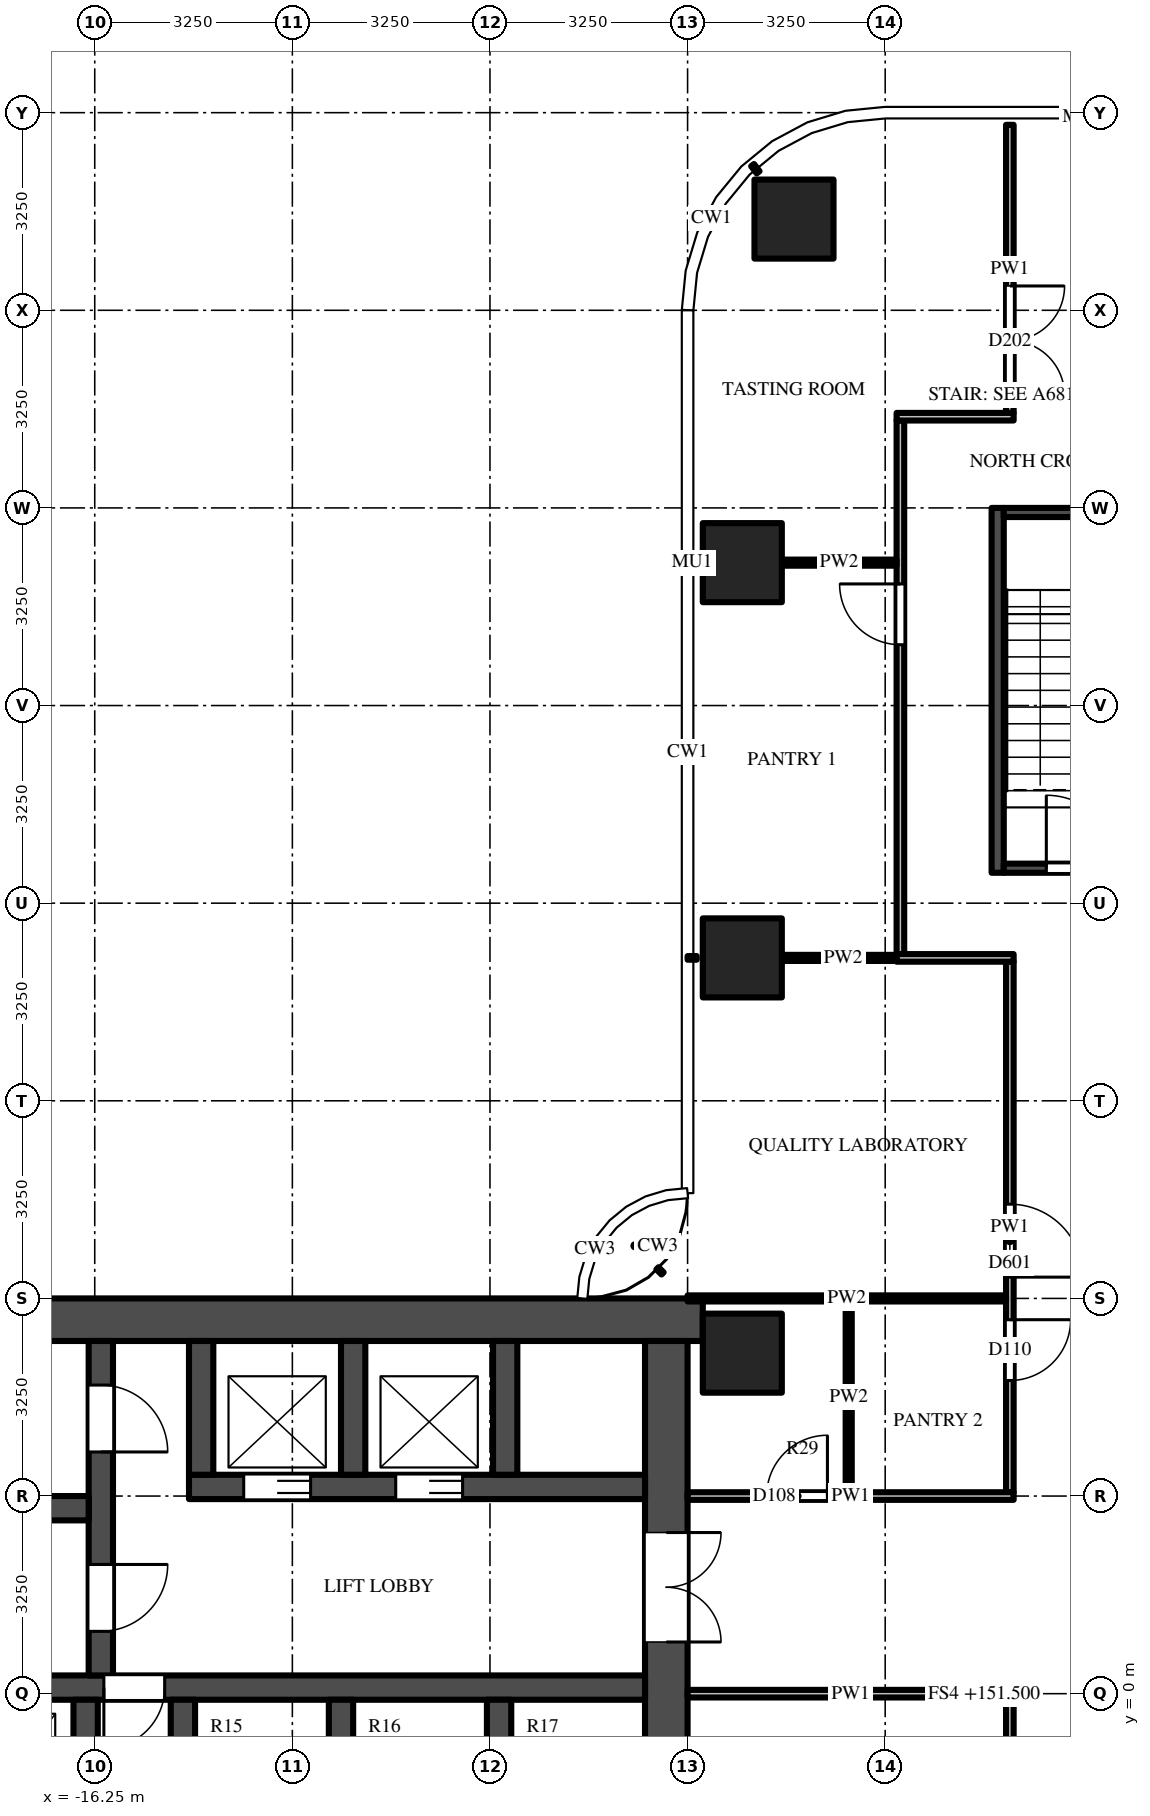
"""IFC4 building model, lengths in metres.
Left out: names, types, materials, properties, quantities, classifications, styles, units other than length and angle.
Written with IfcOpenShell. Run it as: python <this file> out.ifc"""

import sys

from ifc_helpers import new_model, si_unit, direction, frame, frame_2d, origin, origin_2d, place, context, subcontext, project, spatial, rectangle, extrude, source, transform, mapped, element, fill, save


model = new_model("IFC4")
c1 = context("Model", 3, precision=1e-05, world=origin(), true_north=direction((0.0, 1.0)))
c2 = subcontext(c1, "Body", "Model", "MODEL_VIEW")
j1 = project(units=[si_unit("LENGTHUNIT", "METRE"), si_unit("PLANEANGLEUNIT", "RADIAN")], contexts=[c1])
p1 = place(None, origin())
s1 = spatial("IfcSite", under=j1, at=p1, CompositionType="ELEMENT")
p2 = place(p1, origin())
s2 = spatial("IfcBuilding", under=s1, at=p2, CompositionType="ELEMENT")
p3 = place(p2, frame((0.0, 0.0, 151.5)))
s3 = spatial("IfcBuildingStorey", under=s2, at=p3, CompositionType="ELEMENT", Elevation=151.5)
m1 = source(origin(), c2, "Body", "SweptSolid", [
    extrude(rectangle(XDim=1.3, YDim=1.3, at=origin_2d()), origin(), (0.0, 0.0, 1.0), 4.5),
])
for number, where, z_axis, x_axis in (
    (1, (-5.6, 12.1, 0.0), (0.0, 0.0, 1.0), (1.0, 0.0, 0.0)),
    (2, (-5.6, 18.6, 0.0), (0.0, 0.0, 1.0), (1.0, 0.0, 0.0)),
    (3, (-4.75, 24.25, 0.0), (0.0, 0.0, 1.0), (1.0, 0.0, 0.0)),
    (4, (-5.6, 5.6, 0.0), (0.0, 0.0, 1.0), (1.0, 0.0, 0.0)),
):
    element("IfcColumn", number, at=place(p3, frame(where, z_axis=z_axis, x_axis=x_axis)), inside=s3, PredefinedType="COLUMN", context=c2, shape_type="MappedRepresentation", body=[
        mapped(m1, transform((0.0, 0.0, 0.0))),
    ])
m2 = source(origin(), c2, "Body", "SweptSolid", [
    extrude(rectangle(XDim=16.5, YDim=0.7, at=frame_2d((8.25, 0.0))), origin(), (0.0, 0.0, 1.0), 4.15),
])
p4 = place(p3, frame((-6.25, 6.15, 0.0), z_axis=(0.0, 0.0, 1.0), x_axis=(-1.0, 0.0, 0.0)))
e5 = element("IfcWall", 5, at=p4, inside=s3, PredefinedType="SHEAR", context=c2, shape_type="MappedRepresentation", body=[
    mapped(m2, transform((0.0, 0.0, 0.0))),
])
m3 = source(origin(), c2, "Body", "SweptSolid", [
    extrude(rectangle(XDim=9.05, YDim=0.7, at=frame_2d((4.525, 0.0))), origin(), (0.0, 0.0, 1.0), 4.15),
])
p5 = place(p3, frame((-6.85, 5.8, 0.0), z_axis=(0.0, 0.0, 1.0), x_axis=(0.0, -1.0, 0.0)))
e6 = element("IfcWall", 6, at=p5, inside=s3, PredefinedType="SHEAR", context=c2, shape_type="MappedRepresentation", body=[
    mapped(m3, transform((0.0, 0.0, 0.0))),
])
m4 = source(origin(), c2, "Body", "SweptSolid", [
    extrude(rectangle(XDim=1.8, YDim=2.1, at=frame_2d((0.9, 1.05))), frame((0.0, 0.36, 0.0), z_axis=(0.0, -1.0, 0.0), x_axis=(1.0, 0.0, 0.0)), (0.0, 0.0, 1.0), 0.72),
])
p6 = place(p5, frame((3.15, 0.0, 0.0)))
e7 = element("IfcOpeningElement", 7, at=p6, cuts=e6, PredefinedType="OPENING", context=c2, shape_type="MappedRepresentation", body=[
    mapped(m4, transform((0.0, 0.0, 0.0))),
])
m5 = source(origin(), c2, "Body", "SweptSolid", [
    extrude(rectangle(XDim=7.5, YDim=0.4, at=frame_2d((3.75, 0.0))), origin(), (0.0, 0.0, 1.0), 4.15),
])
p7 = place(p3, frame((-7.2, 3.4, 0.0), z_axis=(0.0, 0.0, 1.0), x_axis=(-1.0, 0.0, 0.0)))
e8 = element("IfcWall", 8, at=p7, inside=s3, PredefinedType="SHEAR", context=c2, shape_type="MappedRepresentation", body=[
    mapped(m5, transform((0.0, 0.0, 0.0))),
])
m6 = source(origin(), c2, "Body", "SweptSolid", [
    extrude(rectangle(XDim=1.1, YDim=2.1, at=frame_2d((0.55, 1.05))), frame((0.0, 0.21, 0.0), z_axis=(0.0, -1.0, 0.0), x_axis=(1.0, 0.0, 0.0)), (0.0, 0.0, 1.0), 0.42),
])
p8 = place(p7, frame((3.0, 0.0, 0.0)))
e9 = element("IfcOpeningElement", 9, at=p8, cuts=e8, PredefinedType="OPENING", context=c2, shape_type="MappedRepresentation", body=[
    mapped(m6, transform((0.0, 0.0, 0.0))),
])
p9 = place(p7, frame((5.5, 0.0, 0.0)))
e10 = element("IfcOpeningElement", 10, at=p9, cuts=e8, PredefinedType="OPENING", context=c2, shape_type="MappedRepresentation", body=[
    mapped(m6, transform((0.0, 0.0, 0.0))),
])
m7 = source(origin(), c2, "Body", "SweptSolid", [
    extrude(rectangle(XDim=14.85, YDim=0.4, at=frame_2d((7.425, 0.0))), origin(), (0.0, 0.0, 1.0), 4.15),
])
p10 = place(p3, frame((-7.2, 0.1, 0.0), z_axis=(0.0, 0.0, 1.0), x_axis=(-1.0, 0.0, 0.0)))
e11 = element("IfcWall", 11, at=p10, inside=s3, PredefinedType="SHEAR", context=c2, shape_type="MappedRepresentation", body=[
    mapped(m7, transform((0.0, 0.0, 0.0))),
])
m8 = source(origin(), c2, "Body", "SweptSolid", [
    extrude(rectangle(XDim=1.0, YDim=2.1, at=frame_2d((0.5, 1.05))), frame((0.0, 0.21, 0.0), z_axis=(0.0, -1.0, 0.0), x_axis=(1.0, 0.0, 0.0)), (0.0, 0.0, 1.0), 0.42),
])
p11 = place(p10, frame((7.9, 0.0, 0.0)))
e12 = element("IfcOpeningElement", 12, at=p11, cuts=e11, PredefinedType="OPENING", context=c2, shape_type="MappedRepresentation", body=[
    mapped(m8, transform((0.0, 0.0, 0.0))),
])
m9 = source(origin(), c2, "Body", "SweptSolid", [
    extrude(rectangle(XDim=5.5, YDim=0.4, at=frame_2d((2.75, 0.0))), origin(), (0.0, 0.0, 1.0), 4.15),
])
p12 = place(p3, frame((-16.15, 5.8, 0.0), z_axis=(0.0, 0.0, 1.0), x_axis=(0.0, -1.0, 0.0)))
e13 = element("IfcWall", 13, at=p12, inside=s3, PredefinedType="SHEAR", context=c2, shape_type="MappedRepresentation", body=[
    mapped(m9, transform((0.0, 0.0, 0.0))),
])
p13 = place(p12, frame((0.725, 0.0, 0.0)))
e14 = element("IfcOpeningElement", 14, at=p13, cuts=e13, PredefinedType="OPENING", context=c2, shape_type="MappedRepresentation", body=[
    mapped(m6, transform((0.0, 0.0, 0.0))),
])
p14 = place(p12, frame((3.675, 0.0, 0.0)))
e15 = element("IfcOpeningElement", 15, at=p14, cuts=e13, PredefinedType="OPENING", context=c2, shape_type="MappedRepresentation", body=[
    mapped(m6, transform((0.0, 0.0, 0.0))),
])
m10 = source(origin(), c2, "Body", "SweptSolid", [
    extrude(rectangle(XDim=5.7, YDim=0.4, at=frame_2d((2.85, 0.0))), origin(), (0.0, 0.0, 1.0), 4.15),
])
p15 = place(p3, frame((-16.35, 3.05, 0.0), z_axis=(0.0, 0.0, 1.0), x_axis=(-1.0, 0.0, 0.0)))
e16 = element("IfcWall", 16, at=p15, inside=s3, PredefinedType="SHEAR", context=c2, shape_type="MappedRepresentation", body=[
    mapped(m10, transform((0.0, 0.0, 0.0))),
])
m11 = source(origin(), c2, "Body", "SweptSolid", [
    extrude(rectangle(XDim=2.2, YDim=0.4, at=frame_2d((1.1, 0.0))), origin(), (0.0, 0.0, 1.0), 4.15),
])
for number, where, z_axis, x_axis in (
    (17, (-9.5, 5.8, 0.0), (0.0, 0.0, 1.0), (0.0, -1.0, 0.0)),
    (18, (-12.0, 5.8, 0.0), (0.0, 0.0, 1.0), (0.0, -1.0, 0.0)),
    (19, (-14.5, 5.8, 0.0), (0.0, 0.0, 1.0), (0.0, -1.0, 0.0)),
):
    element("IfcWall", number, at=place(p3, frame(where, z_axis=z_axis, x_axis=x_axis)), inside=s3, PredefinedType="SHEAR", context=c2, shape_type="MappedRepresentation", body=[
        mapped(m11, transform((0.0, 0.0, 0.0))),
    ])
m12 = source(origin(), c2, "Body", "SweptSolid", [
    extrude(rectangle(XDim=2.45, YDim=0.4, at=frame_2d((1.225, 0.0))), origin(), (0.0, 0.0, 1.0), 4.15),
])
for number, where, z_axis, x_axis in (
    (20, (-9.6, -0.1, 0.0), (0.0, 0.0, 1.0), (0.0, -1.0, 0.0)),
    (21, (-12.2, -0.1, 0.0), (0.0, 0.0, 1.0), (0.0, -1.0, 0.0)),
    (22, (-14.8, -0.1, 0.0), (0.0, 0.0, 1.0), (0.0, -1.0, 0.0)),
    (23, (-16.4, -0.1, 0.0), (0.0, 0.0, 1.0), (0.0, -1.0, 0.0)),
):
    element("IfcWall", number, at=place(p3, frame(where, z_axis=z_axis, x_axis=x_axis)), inside=s3, PredefinedType="SHEAR", context=c2, shape_type="MappedRepresentation", body=[
        mapped(m12, transform((0.0, 0.0, 0.0))),
    ])
m13 = source(origin(), c2, "Body", "SweptSolid", [
    extrude(rectangle(XDim=6.0, YDim=0.2, at=frame_2d((3.0, 0.0))), origin(), (0.0, 0.0, 1.0), 4.15),
])
p16 = place(p3, frame((-1.4, 13.5, 0.0), z_axis=(0.0, 0.0, 1.0), x_axis=(0.0, 1.0, 0.0)))
e24 = element("IfcWall", 24, at=p16, inside=s3, PredefinedType="SHEAR", context=c2, shape_type="MappedRepresentation", body=[
    mapped(m13, transform((0.0, 0.0, 0.0))),
])
m14 = source(origin(), c2, "Body", "SweptSolid", [
    extrude(rectangle(XDim=2.6, YDim=0.15, at=frame_2d((1.3, 0.0))), origin(), (0.0, 0.0, 1.0), 4.15),
])
p17 = place(p3, frame((-1.3, 13.575, 0.0), z_axis=(0.0, 0.0, 1.0), x_axis=(1.0, 0.0, 0.0)))
e25 = element("IfcWall", 25, at=p17, inside=s3, PredefinedType="SHEAR", context=c2, shape_type="MappedRepresentation", body=[
    mapped(m14, transform((0.0, 0.0, 0.0))),
])
m15 = source(origin(), c2, "Body", "SweptSolid", [
    extrude(rectangle(XDim=1.2, YDim=2.1, at=frame_2d((0.6, 1.05))), frame((0.0, 0.085, 0.0), z_axis=(0.0, -1.0, 0.0), x_axis=(1.0, 0.0, 0.0)), (0.0, 0.0, 1.0), 0.17),
])
p18 = place(p17, frame((0.7, 0.0, 0.0)))
e26 = element("IfcOpeningElement", 26, at=p18, cuts=e25, PredefinedType="OPENING", context=c2, shape_type="MappedRepresentation", body=[
    mapped(m15, transform((0.0, 0.0, 0.0))),
])
p19 = place(p3, frame((-1.3, 19.425, 0.0), z_axis=(0.0, 0.0, 1.0), x_axis=(1.0, 0.0, 0.0)))
e27 = element("IfcWall", 27, at=p19, inside=s3, PredefinedType="SHEAR", context=c2, shape_type="MappedRepresentation", body=[
    mapped(m14, transform((0.0, 0.0, 0.0))),
])
p20 = place(p3, frame((-3.85, 3.312, 0.0), z_axis=(0.0, 0.0, 1.0), x_axis=(0.0, 1.0, 0.0)))
e28 = element("IfcWall", 28, at=p20, inside=s3, PredefinedType="PARTITIONING", context=c2, shape_type="SweptSolid", body=[
    extrude(rectangle(XDim=3.137, YDim=0.1, at=frame_2d((1.569, 0.0))), origin(), (0.0, 0.0, 1.0), 3.368),
])
m16 = source(origin(), c2, "Body", "SweptSolid", [
    extrude(rectangle(XDim=8.788, YDim=0.125, at=frame_2d((4.394, 0.0))), origin(), (0.0, 0.0, 1.0), 3.368),
])
p21 = place(p3, frame((-3.0, 12.15, 0.0), z_axis=(0.0, 0.0, 1.0), x_axis=(0.0, 1.0, 0.0)))
e29 = element("IfcWall", 29, at=p21, inside=s3, PredefinedType="PARTITIONING", context=c2, shape_type="MappedRepresentation", body=[
    mapped(m16, transform((0.0, 0.0, 0.0))),
])
m17 = source(origin(), c2, "Body", "SweptSolid", [
    extrude(rectangle(XDim=1.0, YDim=2.1, at=frame_2d((0.5, 1.05))), frame((0.0, 0.073, 0.0), z_axis=(0.0, -1.0, 0.0), x_axis=(1.0, 0.0, 0.0)), (0.0, 0.0, 1.0), 0.145),
])
p22 = place(p21, frame((5.1, 0.0, 0.0)))
e30 = element("IfcOpeningElement", 30, at=p22, cuts=e29, PredefinedType="OPENING", context=c2, shape_type="MappedRepresentation", body=[
    mapped(m17, transform((0.0, 0.0, 0.0))),
])
m18 = source(origin(), c2, "Body", "SweptSolid", [
    extrude(rectangle(XDim=3.125, YDim=0.125, at=frame_2d((1.562, 0.0))), origin(), (0.0, 0.0, 1.0), 3.447),
])
p23 = place(p3, frame((-1.2, -0.062, 0.0), z_axis=(0.0, 0.0, 1.0), x_axis=(0.0, -1.0, 0.0)))
e31 = element("IfcWall", 31, at=p23, inside=s3, PredefinedType="PARTITIONING", context=c2, shape_type="MappedRepresentation", body=[
    mapped(m18, transform((0.0, 0.0, 0.0))),
])
m19 = source(origin(), c2, "Body", "SweptSolid", [
    extrude(rectangle(XDim=8.725, YDim=0.125, at=frame_2d((4.363, 0.0))), origin(), (0.0, 0.0, 1.0), 3.368),
])
p24 = place(p3, frame((-1.2, 12.038, 0.0), z_axis=(0.0, 0.0, 1.0), x_axis=(0.0, -1.0, 0.0)))
e32 = element("IfcWall", 32, at=p24, inside=s3, PredefinedType="PARTITIONING", context=c2, shape_type="MappedRepresentation", body=[
    mapped(m19, transform((0.0, 0.0, 0.0))),
])
p25 = place(p24, frame((5.887, 0.0, 0.0)))
e33 = element("IfcOpeningElement", 33, at=p25, cuts=e32, PredefinedType="OPENING", context=c2, shape_type="MappedRepresentation", body=[
    mapped(m17, transform((0.0, 0.0, 0.0))),
])
m20 = source(origin(), c2, "Body", "SweptSolid", [
    extrude(rectangle(XDim=1.2, YDim=2.1, at=frame_2d((0.6, 1.05))), frame((0.0, 0.073, 0.0), z_axis=(0.0, -1.0, 0.0), x_axis=(1.0, 0.0, 0.0)), (0.0, 0.0, 1.0), 0.145),
])
p26 = place(p24, frame((3.988, 0.0, 0.0)))
e34 = element("IfcOpeningElement", 34, at=p26, cuts=e32, PredefinedType="OPENING", context=c2, shape_type="MappedRepresentation", body=[
    mapped(m20, transform((0.0, 0.0, 0.0))),
])
m21 = source(origin(), c2, "Body", "SweptSolid", [
    extrude(rectangle(XDim=4.738, YDim=0.125, at=frame_2d((2.369, 0.0))), origin(), (0.0, 0.0, 1.0), 3.23),
])
p27 = place(p3, frame((-1.2, 25.8, 0.0), z_axis=(0.0, 0.0, 1.0), x_axis=(0.0, -1.0, 0.0)))
e35 = element("IfcWall", 35, at=p27, inside=s3, PredefinedType="PARTITIONING", context=c2, shape_type="MappedRepresentation", body=[
    mapped(m21, transform((0.0, 0.0, 0.0))),
])
m22 = source(origin(), c2, "Body", "SweptSolid", [
    extrude(rectangle(XDim=1.8, YDim=2.1, at=frame_2d((0.9, 1.05))), frame((0.0, 0.073, 0.0), z_axis=(0.0, -1.0, 0.0), x_axis=(1.0, 0.0, 0.0)), (0.0, 0.0, 1.0), 0.145),
])
p28 = place(p27, frame((2.65, 0.0, 0.0)))
e36 = element("IfcOpeningElement", 36, at=p28, cuts=e35, PredefinedType="OPENING", context=c2, shape_type="MappedRepresentation", body=[
    mapped(m22, transform((0.0, 0.0, 0.0))),
])
m23 = source(origin(), c2, "Body", "SweptSolid", [
    extrude(rectangle(XDim=5.363, YDim=0.125, at=frame_2d((2.681, 0.0))), origin(), (0.0, 0.0, 1.0), 3.368),
])
p29 = place(p3, frame((-1.137, 0.0, 0.0), z_axis=(0.0, 0.0, 1.0), x_axis=(-1.0, 0.0, 0.0)))
e37 = element("IfcWall", 37, at=p29, inside=s3, PredefinedType="PARTITIONING", context=c2, shape_type="MappedRepresentation", body=[
    mapped(m23, transform((0.0, 0.0, 0.0))),
])
p30 = place(p3, frame((-6.5, 3.25, 0.0), z_axis=(0.0, 0.0, 1.0), x_axis=(1.0, 0.0, 0.0)))
e38 = element("IfcWall", 38, at=p30, inside=s3, PredefinedType="PARTITIONING", context=c2, shape_type="MappedRepresentation", body=[
    mapped(m23, transform((0.0, 0.0, 0.0))),
])
p31 = place(p30, frame((1.3, 0.0, 0.0)))
e39 = element("IfcOpeningElement", 39, at=p31, cuts=e38, PredefinedType="OPENING", context=c2, shape_type="MappedRepresentation", body=[
    mapped(m17, transform((0.0, 0.0, 0.0))),
])
m24 = source(origin(), c2, "Body", "SweptSolid", [
    extrude(rectangle(XDim=5.238, YDim=0.1, at=frame_2d((2.619, 0.0))), origin(), (0.0, 0.0, 1.0), 3.23),
])
p32 = place(p3, frame((-6.5, 6.5, 0.0), z_axis=(0.0, 0.0, 1.0), x_axis=(1.0, 0.0, 0.0)))
e40 = element("IfcWall", 40, at=p32, inside=s3, PredefinedType="PARTITIONING", context=c2, shape_type="MappedRepresentation", body=[
    mapped(m24, transform((0.0, 0.0, 0.0))),
])
m25 = source(origin(), c2, "Body", "SweptSolid", [
    extrude(rectangle(XDim=2.012, YDim=0.1, at=frame_2d((1.006, 0.0))), origin(), (0.0, 0.0, 1.0), 3.368),
])
p33 = place(p3, frame((-4.95, 12.1, 0.0), z_axis=(0.0, 0.0, 1.0), x_axis=(1.0, 0.0, 0.0)))
e41 = element("IfcWall", 41, at=p33, inside=s3, PredefinedType="PARTITIONING", context=c2, shape_type="MappedRepresentation", body=[
    mapped(m25, transform((0.0, 0.0, 0.0))),
])
m26 = source(origin(), c2, "Body", "SweptSolid", [
    extrude(rectangle(XDim=1.925, YDim=0.125, at=frame_2d((0.962, 0.0))), origin(), (0.0, 0.0, 1.0), 3.368),
])
p34 = place(p3, frame((-1.137, 12.1, 0.0), z_axis=(0.0, 0.0, 1.0), x_axis=(-1.0, 0.0, 0.0)))
e42 = element("IfcWall", 42, at=p34, inside=s3, PredefinedType="PARTITIONING", context=c2, shape_type="MappedRepresentation", body=[
    mapped(m26, transform((0.0, 0.0, 0.0))),
])
p35 = place(p3, frame((-4.95, 18.6, 0.0), z_axis=(0.0, 0.0, 1.0), x_axis=(1.0, 0.0, 0.0)))
e43 = element("IfcWall", 43, at=p35, inside=s3, PredefinedType="PARTITIONING", context=c2, shape_type="SweptSolid", body=[
    extrude(rectangle(XDim=1.887, YDim=0.1, at=frame_2d((0.944, 0.0))), origin(), (0.0, 0.0, 1.0), 3.597),
])
m27 = source(origin(), c2, "Body", "SweptSolid", [
    extrude(rectangle(XDim=1.925, YDim=0.125, at=frame_2d((0.962, 0.0))), origin(), (0.0, 0.0, 1.0), 4.15),
])
p36 = place(p3, frame((-3.062, 21.0, 0.0), z_axis=(0.0, 0.0, 1.0), x_axis=(1.0, 0.0, 0.0)))
e44 = element("IfcWall", 44, at=p36, inside=s3, PredefinedType="PARTITIONING", context=c2, shape_type="MappedRepresentation", body=[
    mapped(m27, transform((0.0, 0.0, 0.0))),
])
m28 = source(origin(), c2, "Body", "SweptSolid", [
    extrude(rectangle(XDim=1.1, YDim=2.1, at=frame_2d((0.55, 1.05))), frame((0.0, 0.025, 0.0), z_axis=(0.0, -1.0, 0.0), x_axis=(1.0, 0.0, 0.0)), (0.0, 0.0, 1.0), 0.05),
])
p37 = place(p8, origin())
e45 = element("IfcDoor", 45, at=p37, inside=s3, OperationType="DOUBLE_DOOR_SLIDING", PredefinedType="DOOR", context=c2, shape_type="MappedRepresentation", body=[
    mapped(m28, transform((0.0, 0.0, 0.0))),
])
fill(e9, e45)
p38 = place(p9, origin())
e46 = element("IfcDoor", 46, at=p38, inside=s3, OperationType="DOUBLE_DOOR_SLIDING", PredefinedType="DOOR", context=c2, shape_type="MappedRepresentation", body=[
    mapped(m28, transform((0.0, 0.0, 0.0))),
])
fill(e10, e46)
m29 = source(origin(), c2, "Body", "SweptSolid", [
    extrude(rectangle(XDim=1.8, YDim=2.1, at=frame_2d((0.9, 1.05))), frame((0.0, -0.275, 0.0), z_axis=(0.0, -1.0, 0.0), x_axis=(1.0, 0.0, 0.0)), (0.0, 0.0, 1.0), 0.05),
])
p39 = place(p6, origin())
e47 = element("IfcDoor", 47, at=p39, inside=s3, OperationType="DOUBLE_DOOR_SINGLE_SWING", PredefinedType="DOOR", context=c2, shape_type="MappedRepresentation", body=[
    mapped(m29, transform((0.0, 0.0, 0.0))),
])
fill(e7, e47)
p40 = place(p13, origin())
e48 = element("IfcDoor", 48, at=p40, inside=s3, OperationType="SINGLE_SWING_RIGHT", PredefinedType="DOOR", context=c2, shape_type="MappedRepresentation", body=[
    mapped(m28, transform((0.0, 0.0, 0.0))),
])
fill(e14, e48)
p41 = place(p14, origin())
e49 = element("IfcDoor", 49, at=p41, inside=s3, OperationType="SINGLE_SWING_LEFT", PredefinedType="DOOR", context=c2, shape_type="MappedRepresentation", body=[
    mapped(m28, transform((0.0, 0.0, 0.0))),
])
fill(e15, e49)
m30 = source(origin(), c2, "Body", "SweptSolid", [
    extrude(rectangle(XDim=1.0, YDim=2.1, at=frame_2d((0.5, 1.05))), frame((0.0, 0.025, 0.0), z_axis=(0.0, -1.0, 0.0), x_axis=(1.0, 0.0, 0.0)), (0.0, 0.0, 1.0), 0.05),
])
p42 = place(p11, origin())
e50 = element("IfcDoor", 50, at=p42, inside=s3, OperationType="SINGLE_SWING_RIGHT", PredefinedType="DOOR", context=c2, shape_type="MappedRepresentation", body=[
    mapped(m30, transform((0.0, 0.0, 0.0))),
])
fill(e12, e50)
m31 = source(origin(), c2, "Body", "SweptSolid", [
    extrude(rectangle(XDim=1.2, YDim=2.1, at=frame_2d((0.6, 1.05))), frame((0.0, 0.025, 0.0), z_axis=(0.0, -1.0, 0.0), x_axis=(1.0, 0.0, 0.0)), (0.0, 0.0, 1.0), 0.05),
])
p43 = place(p18, origin())
e51 = element("IfcDoor", 51, at=p43, inside=s3, OperationType="SINGLE_SWING_LEFT", PredefinedType="DOOR", context=c2, shape_type="MappedRepresentation", body=[
    mapped(m31, transform((0.0, 0.0, 0.0))),
])
fill(e26, e51)
p44 = place(p31, origin())
e52 = element("IfcDoor", 52, at=p44, inside=s3, OperationType="SINGLE_SWING_RIGHT", PredefinedType="DOOR", context=c2, shape_type="MappedRepresentation", body=[
    mapped(m30, transform((0.0, 0.0, 0.0))),
])
fill(e39, e52)
p45 = place(p25, origin())
e53 = element("IfcDoor", 53, at=p45, inside=s3, OperationType="SINGLE_SWING_LEFT", PredefinedType="DOOR", context=c2, shape_type="MappedRepresentation", body=[
    mapped(m30, transform((0.0, 0.0, 0.0))),
])
fill(e33, e53)
p46 = place(p26, origin())
e54 = element("IfcDoor", 54, at=p46, inside=s3, OperationType="SINGLE_SWING_RIGHT", PredefinedType="DOOR", context=c2, shape_type="MappedRepresentation", body=[
    mapped(m31, transform((0.0, 0.0, 0.0))),
])
fill(e34, e54)
p47 = place(p22, origin())
e55 = element("IfcDoor", 55, at=p47, inside=s3, OperationType="SINGLE_SWING_RIGHT", PredefinedType="DOOR", context=c2, shape_type="MappedRepresentation", body=[
    mapped(m30, transform((0.0, 0.0, 0.0))),
])
fill(e30, e55)
m32 = source(origin(), c2, "Body", "SweptSolid", [
    extrude(rectangle(XDim=1.8, YDim=2.1, at=frame_2d((0.9, 1.05))), frame((0.0, 0.025, 0.0), z_axis=(0.0, -1.0, 0.0), x_axis=(1.0, 0.0, 0.0)), (0.0, 0.0, 1.0), 0.05),
])
p48 = place(p28, origin())
e56 = element("IfcDoor", 56, at=p48, inside=s3, OperationType="DOUBLE_DOOR_SINGLE_SWING", PredefinedType="DOOR", context=c2, shape_type="MappedRepresentation", body=[
    mapped(m32, transform((0.0, 0.0, 0.0))),
])
fill(e36, e56)
save(model, sys.argv[1])
